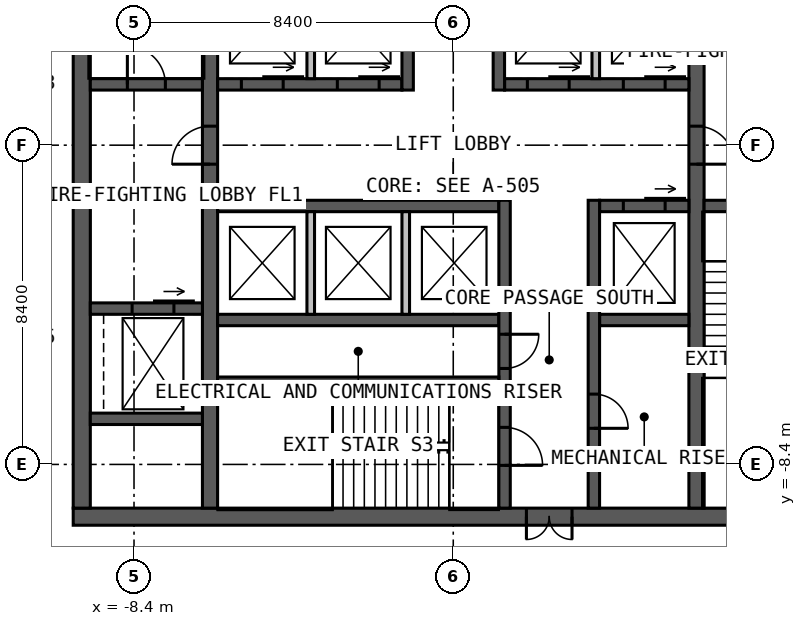
"""IFC4 building model, lengths in metres.
Left out: names, types, materials, properties, quantities, classifications, styles, units other than length and angle.
Written with IfcOpenShell. Run it as: python <this file> out.ifc"""

import sys

from ifc_helpers import new_model, si_unit, direction, frame, frame_2d, origin, place, context, subcontext, project, spatial, rectangle, extrude, element, fill, save


model = new_model("IFC4")
c1 = context("Model", 3, precision=1e-05, world=origin(), true_north=direction((0.0, 1.0)))
c2 = subcontext(c1, "Body", "Model", "MODEL_VIEW")
j1 = project(units=[si_unit("LENGTHUNIT", "METRE"), si_unit("PLANEANGLEUNIT", "RADIAN")], contexts=[c1])
p1 = place(None, origin())
s1 = spatial("IfcSite", under=j1, at=p1, CompositionType="ELEMENT")
p2 = place(p1, origin())
s2 = spatial("IfcBuilding", under=s1, at=p2, CompositionType="ELEMENT")
p3 = place(p2, frame((0.0, 0.0, 211.0)))
s3 = spatial("IfcBuildingStorey", under=s2, at=p3, CompositionType="ELEMENT", Elevation=211.0)
p4 = place(p3, frame((10.0, -9.775, 0.0), z_axis=(0.0, 0.0, 1.0), x_axis=(-1.0, 0.0, 0.0)))
e1 = element("IfcWall", 1, at=p4, inside=s3, PredefinedType="SOLIDWALL", context=c2, shape_type="SweptSolid", body=[
    extrude(rectangle(XDim=20.0, YDim=0.45, at=frame_2d((10.0, 0.0))), origin(), (0.0, 0.0, 1.0), 4.0),
])
p5 = place(p4, frame((6.875, 0.0, 0.0)))
e2 = element("IfcOpeningElement", 2, at=p5, cuts=e1, PredefinedType="OPENING", context=c2, shape_type="SweptSolid", body=[
    extrude(rectangle(XDim=1.2, YDim=2.2, at=frame_2d((0.6, 1.1))), frame((0.0, 0.235, 0.0), z_axis=(0.0, -1.0, 0.0), x_axis=(1.0, 0.0, 0.0)), (0.0, 0.0, 1.0), 0.47),
])
p6 = place(p3, frame((-9.775, 9.55, 0.0), z_axis=(0.0, 0.0, 1.0), x_axis=(0.0, -1.0, 0.0)))
e3 = element("IfcWall", 3, at=p6, inside=s3, PredefinedType="SOLIDWALL", context=c2, shape_type="SweptSolid", body=[
    extrude(rectangle(XDim=19.1, YDim=0.45, at=frame_2d((9.55, 0.0))), origin(), (0.0, 0.0, 1.0), 4.0),
])
p7 = place(p3, frame((-6.4, -9.55, 0.0), z_axis=(0.0, 0.0, 1.0), x_axis=(0.0, 1.0, 0.0)))
e4 = element("IfcWall", 4, at=p7, inside=s3, PredefinedType="SOLIDWALL", context=c2, shape_type="SweptSolid", body=[
    extrude(rectangle(XDim=19.1, YDim=0.4, at=frame_2d((9.55, 0.0))), origin(), (0.0, 0.0, 1.0), 4.0),
])
p8 = place(p7, frame((9.05, 0.0, 0.0)))
e5 = element("IfcOpeningElement", 5, at=p8, cuts=e4, PredefinedType="OPENING", context=c2, shape_type="SweptSolid", body=[
    extrude(rectangle(XDim=1.0, YDim=2.2, at=frame_2d((0.5, 1.1))), frame((0.0, 0.21, 0.0), z_axis=(0.0, -1.0, 0.0), x_axis=(1.0, 0.0, 0.0)), (0.0, 0.0, 1.0), 0.42),
])
p9 = place(p3, frame((6.4, 9.55, 0.0), z_axis=(0.0, 0.0, 1.0), x_axis=(0.0, -1.0, 0.0)))
e6 = element("IfcWall", 6, at=p9, inside=s3, PredefinedType="SOLIDWALL", context=c2, shape_type="SweptSolid", body=[
    extrude(rectangle(XDim=19.1, YDim=0.4, at=frame_2d((9.55, 0.0))), origin(), (0.0, 0.0, 1.0), 4.0),
])
p10 = place(p9, frame((9.05, 0.0, 0.0)))
e7 = element("IfcOpeningElement", 7, at=p10, cuts=e6, PredefinedType="OPENING", context=c2, shape_type="SweptSolid", body=[
    extrude(rectangle(XDim=1.0, YDim=2.2, at=frame_2d((0.5, 1.1))), frame((0.0, 0.21, 0.0), z_axis=(0.0, -1.0, 0.0), x_axis=(1.0, 0.0, 0.0)), (0.0, 0.0, 1.0), 0.42),
])
p11 = place(p3, frame((-6.2, 1.6, 0.0), z_axis=(0.0, 0.0, 1.0), x_axis=(1.0, 0.0, 0.0)))
e8 = element("IfcWall", 8, at=p11, inside=s3, PredefinedType="SOLIDWALL", context=c2, shape_type="SweptSolid", body=[
    extrude(rectangle(XDim=4.85, YDim=0.3, at=frame_2d((2.425, 0.0))), origin(), (0.0, 0.0, 1.0), 4.0),
])
p12 = place(p11, frame((0.625, 0.0, 0.0)))
e9 = element("IfcOpeningElement", 9, at=p12, cuts=e8, PredefinedType="OPENING", context=c2, shape_type="SweptSolid", body=[
    extrude(rectangle(XDim=1.1, YDim=2.2, at=frame_2d((0.55, 1.1))), frame((0.0, 0.16, 0.0), z_axis=(0.0, -1.0, 0.0), x_axis=(1.0, 0.0, 0.0)), (0.0, 0.0, 1.0), 0.32),
])
p13 = place(p11, frame((3.15, 0.0, 0.0)))
e10 = element("IfcOpeningElement", 10, at=p13, cuts=e8, PredefinedType="OPENING", context=c2, shape_type="SweptSolid", body=[
    extrude(rectangle(XDim=1.1, YDim=2.2, at=frame_2d((0.55, 1.1))), frame((0.0, 0.16, 0.0), z_axis=(0.0, -1.0, 0.0), x_axis=(1.0, 0.0, 0.0)), (0.0, 0.0, 1.0), 0.32),
])
p14 = place(p3, frame((1.35, 1.6, 0.0), z_axis=(0.0, 0.0, 1.0), x_axis=(1.0, 0.0, 0.0)))
e11 = element("IfcWall", 11, at=p14, inside=s3, PredefinedType="SOLIDWALL", context=c2, shape_type="SweptSolid", body=[
    extrude(rectangle(XDim=4.85, YDim=0.3, at=frame_2d((2.425, 0.0))), origin(), (0.0, 0.0, 1.0), 4.0),
])
p15 = place(p14, frame((0.6, 0.0, 0.0)))
e12 = element("IfcOpeningElement", 12, at=p15, cuts=e11, PredefinedType="OPENING", context=c2, shape_type="SweptSolid", body=[
    extrude(rectangle(XDim=1.1, YDim=2.2, at=frame_2d((0.55, 1.1))), frame((0.0, 0.16, 0.0), z_axis=(0.0, -1.0, 0.0), x_axis=(1.0, 0.0, 0.0)), (0.0, 0.0, 1.0), 0.32),
])
p16 = place(p14, frame((3.125, 0.0, 0.0)))
e13 = element("IfcOpeningElement", 13, at=p16, cuts=e11, PredefinedType="OPENING", context=c2, shape_type="SweptSolid", body=[
    extrude(rectangle(XDim=1.1, YDim=2.2, at=frame_2d((0.55, 1.1))), frame((0.0, 0.16, 0.0), z_axis=(0.0, -1.0, 0.0), x_axis=(1.0, 0.0, 0.0)), (0.0, 0.0, 1.0), 0.32),
])
p17 = place(p3, frame((-1.2, 1.45, 0.0), z_axis=(0.0, 0.0, 1.0), x_axis=(0.0, 1.0, 0.0)))
e14 = element("IfcWall", 14, at=p17, inside=s3, PredefinedType="SOLIDWALL", context=c2, shape_type="SweptSolid", body=[
    extrude(rectangle(XDim=8.1, YDim=0.3, at=frame_2d((4.05, 0.0))), origin(), (0.0, 0.0, 1.0), 4.0),
])
p18 = place(p17, frame((5.05, 0.0, 0.0)))
e15 = element("IfcOpeningElement", 15, at=p18, cuts=e14, PredefinedType="OPENING", context=c2, shape_type="SweptSolid", body=[
    extrude(rectangle(XDim=1.0, YDim=2.2, at=frame_2d((0.5, 1.1))), frame((0.0, 0.16, 0.0), z_axis=(0.0, -1.0, 0.0), x_axis=(1.0, 0.0, 0.0)), (0.0, 0.0, 1.0), 0.32),
])
p19 = place(p3, frame((1.2, 1.45, 0.0), z_axis=(0.0, 0.0, 1.0), x_axis=(0.0, 1.0, 0.0)))
e16 = element("IfcWall", 16, at=p19, inside=s3, PredefinedType="SOLIDWALL", context=c2, shape_type="SweptSolid", body=[
    extrude(rectangle(XDim=8.1, YDim=0.3, at=frame_2d((4.05, 0.0))), origin(), (0.0, 0.0, 1.0), 4.0),
])
p20 = place(p19, frame((3.8, 0.0, 0.0)))
e17 = element("IfcOpeningElement", 17, at=p20, cuts=e16, PredefinedType="OPENING", context=c2, shape_type="SweptSolid", body=[
    extrude(rectangle(XDim=1.0, YDim=2.2, at=frame_2d((0.5, 1.1))), frame((0.0, 0.16, 0.0), z_axis=(0.0, -1.0, 0.0), x_axis=(1.0, 0.0, 0.0)), (0.0, 0.0, 1.0), 0.32),
])
p21 = place(p19, frame((6.15, 0.0, 0.0)))
e18 = element("IfcOpeningElement", 18, at=p21, cuts=e16, PredefinedType="OPENING", context=c2, shape_type="SweptSolid", body=[
    extrude(rectangle(XDim=1.0, YDim=2.2, at=frame_2d((0.5, 1.1))), frame((0.0, 0.16, 0.0), z_axis=(0.0, -1.0, 0.0), x_axis=(1.0, 0.0, 0.0)), (0.0, 0.0, 1.0), 0.32),
])
p22 = place(p3, frame((-6.2, -1.6, 0.0), z_axis=(0.0, 0.0, 1.0), x_axis=(1.0, 0.0, 0.0)))
e19 = element("IfcWall", 19, at=p22, inside=s3, PredefinedType="SOLIDWALL", context=c2, shape_type="SweptSolid", body=[
    extrude(rectangle(XDim=7.4, YDim=0.3, at=frame_2d((3.7, 0.0))), origin(), (0.0, 0.0, 1.0), 4.0),
])
p23 = place(p3, frame((3.85, -1.6, 0.0), z_axis=(0.0, 0.0, 1.0), x_axis=(1.0, 0.0, 0.0)))
e20 = element("IfcWall", 20, at=p23, inside=s3, PredefinedType="SOLIDWALL", context=c2, shape_type="SweptSolid", body=[
    extrude(rectangle(XDim=2.35, YDim=0.3, at=frame_2d((1.175, 0.0))), origin(), (0.0, 0.0, 1.0), 4.0),
])
p24 = place(p23, frame((0.625, 0.0, 0.0)))
e21 = element("IfcOpeningElement", 21, at=p24, cuts=e20, PredefinedType="OPENING", context=c2, shape_type="SweptSolid", body=[
    extrude(rectangle(XDim=1.1, YDim=2.2, at=frame_2d((0.55, 1.1))), frame((0.0, 0.16, 0.0), z_axis=(0.0, -1.0, 0.0), x_axis=(1.0, 0.0, 0.0)), (0.0, 0.0, 1.0), 0.32),
])
p25 = place(p3, frame((-6.2, -4.6, 0.0), z_axis=(0.0, 0.0, 1.0), x_axis=(1.0, 0.0, 0.0)))
e22 = element("IfcWall", 22, at=p25, inside=s3, PredefinedType="SOLIDWALL", context=c2, shape_type="SweptSolid", body=[
    extrude(rectangle(XDim=7.4, YDim=0.3, at=frame_2d((3.7, 0.0))), origin(), (0.0, 0.0, 1.0), 4.0),
])
p26 = place(p3, frame((3.85, -4.6, 0.0), z_axis=(0.0, 0.0, 1.0), x_axis=(1.0, 0.0, 0.0)))
e23 = element("IfcWall", 23, at=p26, inside=s3, PredefinedType="SOLIDWALL", context=c2, shape_type="SweptSolid", body=[
    extrude(rectangle(XDim=2.35, YDim=0.3, at=frame_2d((1.175, 0.0))), origin(), (0.0, 0.0, 1.0), 4.0),
])
p27 = place(p3, frame((1.35, -1.45, 0.0), z_axis=(0.0, 0.0, 1.0), x_axis=(0.0, -1.0, 0.0)))
e24 = element("IfcWall", 24, at=p27, inside=s3, PredefinedType="SOLIDWALL", context=c2, shape_type="SweptSolid", body=[
    extrude(rectangle(XDim=8.1, YDim=0.3, at=frame_2d((4.05, 0.0))), origin(), (0.0, 0.0, 1.0), 4.0),
])
p28 = place(p27, frame((5.975, 0.0, 0.0)))
e25 = element("IfcOpeningElement", 25, at=p28, cuts=e24, PredefinedType="OPENING", context=c2, shape_type="SweptSolid", body=[
    extrude(rectangle(XDim=1.0, YDim=2.2, at=frame_2d((0.5, 1.1))), frame((0.0, 0.16, 0.0), z_axis=(0.0, -1.0, 0.0), x_axis=(1.0, 0.0, 0.0)), (0.0, 0.0, 1.0), 0.32),
])
p29 = place(p27, frame((3.525, 0.0, 0.0)))
e26 = element("IfcOpeningElement", 26, at=p29, cuts=e24, PredefinedType="OPENING", context=c2, shape_type="SweptSolid", body=[
    extrude(rectangle(XDim=0.9, YDim=2.2, at=frame_2d((0.45, 1.1))), frame((0.0, 0.16, 0.0), z_axis=(0.0, -1.0, 0.0), x_axis=(1.0, 0.0, 0.0)), (0.0, 0.0, 1.0), 0.32),
])
p30 = place(p3, frame((3.7, -1.45, 0.0), z_axis=(0.0, 0.0, 1.0), x_axis=(0.0, -1.0, 0.0)))
e27 = element("IfcWall", 27, at=p30, inside=s3, PredefinedType="SOLIDWALL", context=c2, shape_type="SweptSolid", body=[
    extrude(rectangle(XDim=8.1, YDim=0.3, at=frame_2d((4.05, 0.0))), origin(), (0.0, 0.0, 1.0), 4.0),
])
p31 = place(p30, frame((5.1, 0.0, 0.0)))
e28 = element("IfcOpeningElement", 28, at=p31, cuts=e27, PredefinedType="OPENING", context=c2, shape_type="SweptSolid", body=[
    extrude(rectangle(XDim=0.9, YDim=2.2, at=frame_2d((0.45, 1.1))), frame((0.0, 0.16, 0.0), z_axis=(0.0, -1.0, 0.0), x_axis=(1.0, 0.0, 0.0)), (0.0, 0.0, 1.0), 0.32),
])
p32 = place(p3, frame((-6.2, -6.2, 0.0), z_axis=(0.0, 0.0, 1.0), x_axis=(1.0, 0.0, 0.0)))
e29 = element("IfcWall", 29, at=p32, inside=s3, PredefinedType="SOLIDWALL", context=c2, shape_type="SweptSolid", body=[
    extrude(rectangle(XDim=7.4, YDim=0.2, at=frame_2d((3.7, 0.0))), origin(), (0.0, 0.0, 1.0), 4.0),
])
p33 = place(p3, frame((-9.55, 1.6, 0.0), z_axis=(0.0, 0.0, 1.0), x_axis=(1.0, 0.0, 0.0)))
e30 = element("IfcWall", 30, at=p33, inside=s3, PredefinedType="SOLIDWALL", context=c2, shape_type="SweptSolid", body=[
    extrude(rectangle(XDim=2.95, YDim=0.3, at=frame_2d((1.475, 0.0))), origin(), (0.0, 0.0, 1.0), 4.0),
])
p34 = place(p33, frame((0.975, 0.0, 0.0)))
e31 = element("IfcOpeningElement", 31, at=p34, cuts=e30, PredefinedType="OPENING", context=c2, shape_type="SweptSolid", body=[
    extrude(rectangle(XDim=1.0, YDim=2.2, at=frame_2d((0.5, 1.1))), frame((0.0, 0.16, 0.0), z_axis=(0.0, -1.0, 0.0), x_axis=(1.0, 0.0, 0.0)), (0.0, 0.0, 1.0), 0.32),
])
p35 = place(p3, frame((6.6, -1.6, 0.0), z_axis=(0.0, 0.0, 1.0), x_axis=(1.0, 0.0, 0.0)))
e32 = element("IfcWall", 32, at=p35, inside=s3, PredefinedType="SOLIDWALL", context=c2, shape_type="SweptSolid", body=[
    extrude(rectangle(XDim=2.95, YDim=0.3, at=frame_2d((1.475, 0.0))), origin(), (0.0, 0.0, 1.0), 4.0),
])
p36 = place(p35, frame((0.975, 0.0, 0.0)))
e33 = element("IfcOpeningElement", 33, at=p36, cuts=e32, PredefinedType="OPENING", context=c2, shape_type="SweptSolid", body=[
    extrude(rectangle(XDim=1.0, YDim=2.2, at=frame_2d((0.5, 1.1))), frame((0.0, 0.16, 0.0), z_axis=(0.0, -1.0, 0.0), x_axis=(1.0, 0.0, 0.0)), (0.0, 0.0, 1.0), 0.32),
])
p37 = place(p3, frame((-9.55, -4.3, 0.0), z_axis=(0.0, 0.0, 1.0), x_axis=(1.0, 0.0, 0.0)))
e34 = element("IfcWall", 34, at=p37, inside=s3, PredefinedType="SOLIDWALL", context=c2, shape_type="SweptSolid", body=[
    extrude(rectangle(XDim=2.95, YDim=0.3, at=frame_2d((1.475, 0.0))), origin(), (0.0, 0.0, 1.0), 4.0),
])
p38 = place(p37, frame((1.1, 0.0, 0.0)))
e35 = element("IfcOpeningElement", 35, at=p38, cuts=e34, PredefinedType="OPENING", context=c2, shape_type="SweptSolid", body=[
    extrude(rectangle(XDim=1.1, YDim=2.2, at=frame_2d((0.55, 1.1))), frame((0.0, 0.16, 0.0), z_axis=(0.0, -1.0, 0.0), x_axis=(1.0, 0.0, 0.0)), (0.0, 0.0, 1.0), 0.32),
])
p39 = place(p3, frame((-9.55, -7.2, 0.0), z_axis=(0.0, 0.0, 1.0), x_axis=(1.0, 0.0, 0.0)))
e36 = element("IfcWall", 36, at=p39, inside=s3, PredefinedType="SOLIDWALL", context=c2, shape_type="SweptSolid", body=[
    extrude(rectangle(XDim=2.95, YDim=0.3, at=frame_2d((1.475, 0.0))), origin(), (0.0, 0.0, 1.0), 4.0),
])
for number, where, z_axis, x_axis in (
    (37, (-3.75, 1.75, 0.0), (0.0, 0.0, 1.0), (0.0, 1.0, 0.0)),
    (38, (3.75, 1.75, 0.0), (0.0, 0.0, 1.0), (0.0, 1.0, 0.0)),
    (39, (-3.75, -1.75, 0.0), (0.0, 0.0, 1.0), (0.0, -1.0, 0.0)),
    (40, (-1.25, -1.75, 0.0), (0.0, 0.0, 1.0), (0.0, -1.0, 0.0)),
):
    element("IfcWall", number, at=place(p3, frame(where, z_axis=z_axis, x_axis=x_axis)), inside=s3, PredefinedType="SOLIDWALL", context=c2, shape_type="SweptSolid", body=[
        extrude(rectangle(XDim=2.7, YDim=0.2, at=frame_2d((1.35, 0.0))), origin(), (0.0, 0.0, 1.0), 3.75),
    ])
p40 = place(p5, origin())
e41 = element("IfcDoor", 41, at=p40, inside=s3, OperationType="DOUBLE_DOOR_SINGLE_SWING", PredefinedType="DOOR", context=c2, shape_type="SweptSolid", body=[
    extrude(rectangle(XDim=1.2, YDim=2.2, at=frame_2d((0.6, 1.1))), frame((0.0, 0.025, 0.0), z_axis=(0.0, -1.0, 0.0), x_axis=(1.0, 0.0, 0.0)), (0.0, 0.0, 1.0), 0.05),
])
fill(e2, e41)
p41 = place(p8, origin())
e42 = element("IfcDoor", 42, at=p41, inside=s3, OperationType="SINGLE_SWING_LEFT", PredefinedType="DOOR", context=c2, shape_type="SweptSolid", body=[
    extrude(rectangle(XDim=1.0, YDim=2.2, at=frame_2d((0.5, 1.1))), frame((0.0, 0.025, 0.0), z_axis=(0.0, -1.0, 0.0), x_axis=(1.0, 0.0, 0.0)), (0.0, 0.0, 1.0), 0.05),
])
fill(e5, e42)
p42 = place(p10, origin())
e43 = element("IfcDoor", 43, at=p42, inside=s3, OperationType="SINGLE_SWING_RIGHT", PredefinedType="DOOR", context=c2, shape_type="SweptSolid", body=[
    extrude(rectangle(XDim=1.0, YDim=2.2, at=frame_2d((0.5, 1.1))), frame((0.0, 0.025, 0.0), z_axis=(0.0, -1.0, 0.0), x_axis=(1.0, 0.0, 0.0)), (0.0, 0.0, 1.0), 0.05),
])
fill(e7, e43)
p43 = place(p34, origin())
e44 = element("IfcDoor", 44, at=p43, inside=s3, OperationType="SINGLE_SWING_LEFT", PredefinedType="DOOR", context=c2, shape_type="SweptSolid", body=[
    extrude(rectangle(XDim=1.0, YDim=2.2, at=frame_2d((0.5, 1.1))), frame((0.0, 0.025, 0.0), z_axis=(0.0, -1.0, 0.0), x_axis=(1.0, 0.0, 0.0)), (0.0, 0.0, 1.0), 0.05),
])
fill(e31, e44)
p44 = place(p28, origin())
e45 = element("IfcDoor", 45, at=p44, inside=s3, OperationType="SINGLE_SWING_RIGHT", PredefinedType="DOOR", context=c2, shape_type="SweptSolid", body=[
    extrude(rectangle(XDim=1.0, YDim=2.2, at=frame_2d((0.5, 1.1))), frame((0.0, 0.025, 0.0), z_axis=(0.0, -1.0, 0.0), x_axis=(1.0, 0.0, 0.0)), (0.0, 0.0, 1.0), 0.05),
])
fill(e25, e45)
p45 = place(p29, origin())
e46 = element("IfcDoor", 46, at=p45, inside=s3, OperationType="SINGLE_SWING_LEFT", PredefinedType="DOOR", context=c2, shape_type="SweptSolid", body=[
    extrude(rectangle(XDim=0.9, YDim=2.2, at=frame_2d((0.45, 1.1))), frame((0.0, 0.025, 0.0), z_axis=(0.0, -1.0, 0.0), x_axis=(1.0, 0.0, 0.0)), (0.0, 0.0, 1.0), 0.05),
])
fill(e26, e46)
p46 = place(p31, origin())
e47 = element("IfcDoor", 47, at=p46, inside=s3, OperationType="SINGLE_SWING_RIGHT", PredefinedType="DOOR", context=c2, shape_type="SweptSolid", body=[
    extrude(rectangle(XDim=0.9, YDim=2.2, at=frame_2d((0.45, 1.1))), frame((0.0, 0.025, 0.0), z_axis=(0.0, -1.0, 0.0), x_axis=(1.0, 0.0, 0.0)), (0.0, 0.0, 1.0), 0.05),
])
fill(e28, e47)
p47 = place(p12, origin())
e48 = element("IfcDoor", 48, at=p47, inside=s3, OperationType="SLIDING_TO_LEFT", PredefinedType="DOOR", context=c2, shape_type="SweptSolid", body=[
    extrude(rectangle(XDim=1.1, YDim=2.2, at=frame_2d((0.55, 1.1))), frame((0.0, 0.025, 0.0), z_axis=(0.0, -1.0, 0.0), x_axis=(1.0, 0.0, 0.0)), (0.0, 0.0, 1.0), 0.05),
])
fill(e9, e48)
p48 = place(p13, origin())
e49 = element("IfcDoor", 49, at=p48, inside=s3, OperationType="SLIDING_TO_LEFT", PredefinedType="DOOR", context=c2, shape_type="SweptSolid", body=[
    extrude(rectangle(XDim=1.1, YDim=2.2, at=frame_2d((0.55, 1.1))), frame((0.0, 0.025, 0.0), z_axis=(0.0, -1.0, 0.0), x_axis=(1.0, 0.0, 0.0)), (0.0, 0.0, 1.0), 0.05),
])
fill(e10, e49)
p49 = place(p15, origin())
e50 = element("IfcDoor", 50, at=p49, inside=s3, OperationType="SLIDING_TO_LEFT", PredefinedType="DOOR", context=c2, shape_type="SweptSolid", body=[
    extrude(rectangle(XDim=1.1, YDim=2.2, at=frame_2d((0.55, 1.1))), frame((0.0, 0.025, 0.0), z_axis=(0.0, -1.0, 0.0), x_axis=(1.0, 0.0, 0.0)), (0.0, 0.0, 1.0), 0.05),
])
fill(e12, e50)
p50 = place(p16, origin())
e51 = element("IfcDoor", 51, at=p50, inside=s3, OperationType="SLIDING_TO_LEFT", PredefinedType="DOOR", context=c2, shape_type="SweptSolid", body=[
    extrude(rectangle(XDim=1.1, YDim=2.2, at=frame_2d((0.55, 1.1))), frame((0.0, 0.025, 0.0), z_axis=(0.0, -1.0, 0.0), x_axis=(1.0, 0.0, 0.0)), (0.0, 0.0, 1.0), 0.05),
])
fill(e13, e51)
p51 = place(p24, origin())
e52 = element("IfcDoor", 52, at=p51, inside=s3, OperationType="SLIDING_TO_LEFT", PredefinedType="DOOR", context=c2, shape_type="SweptSolid", body=[
    extrude(rectangle(XDim=1.1, YDim=2.2, at=frame_2d((0.55, 1.1))), frame((0.0, 0.025, 0.0), z_axis=(0.0, -1.0, 0.0), x_axis=(1.0, 0.0, 0.0)), (0.0, 0.0, 1.0), 0.05),
])
fill(e21, e52)
p52 = place(p38, origin())
e53 = element("IfcDoor", 53, at=p52, inside=s3, OperationType="SLIDING_TO_LEFT", PredefinedType="DOOR", context=c2, shape_type="SweptSolid", body=[
    extrude(rectangle(XDim=1.1, YDim=2.2, at=frame_2d((0.55, 1.1))), frame((0.0, 0.025, 0.0), z_axis=(0.0, -1.0, 0.0), x_axis=(1.0, 0.0, 0.0)), (0.0, 0.0, 1.0), 0.05),
])
fill(e35, e53)
save(model, sys.argv[1])
